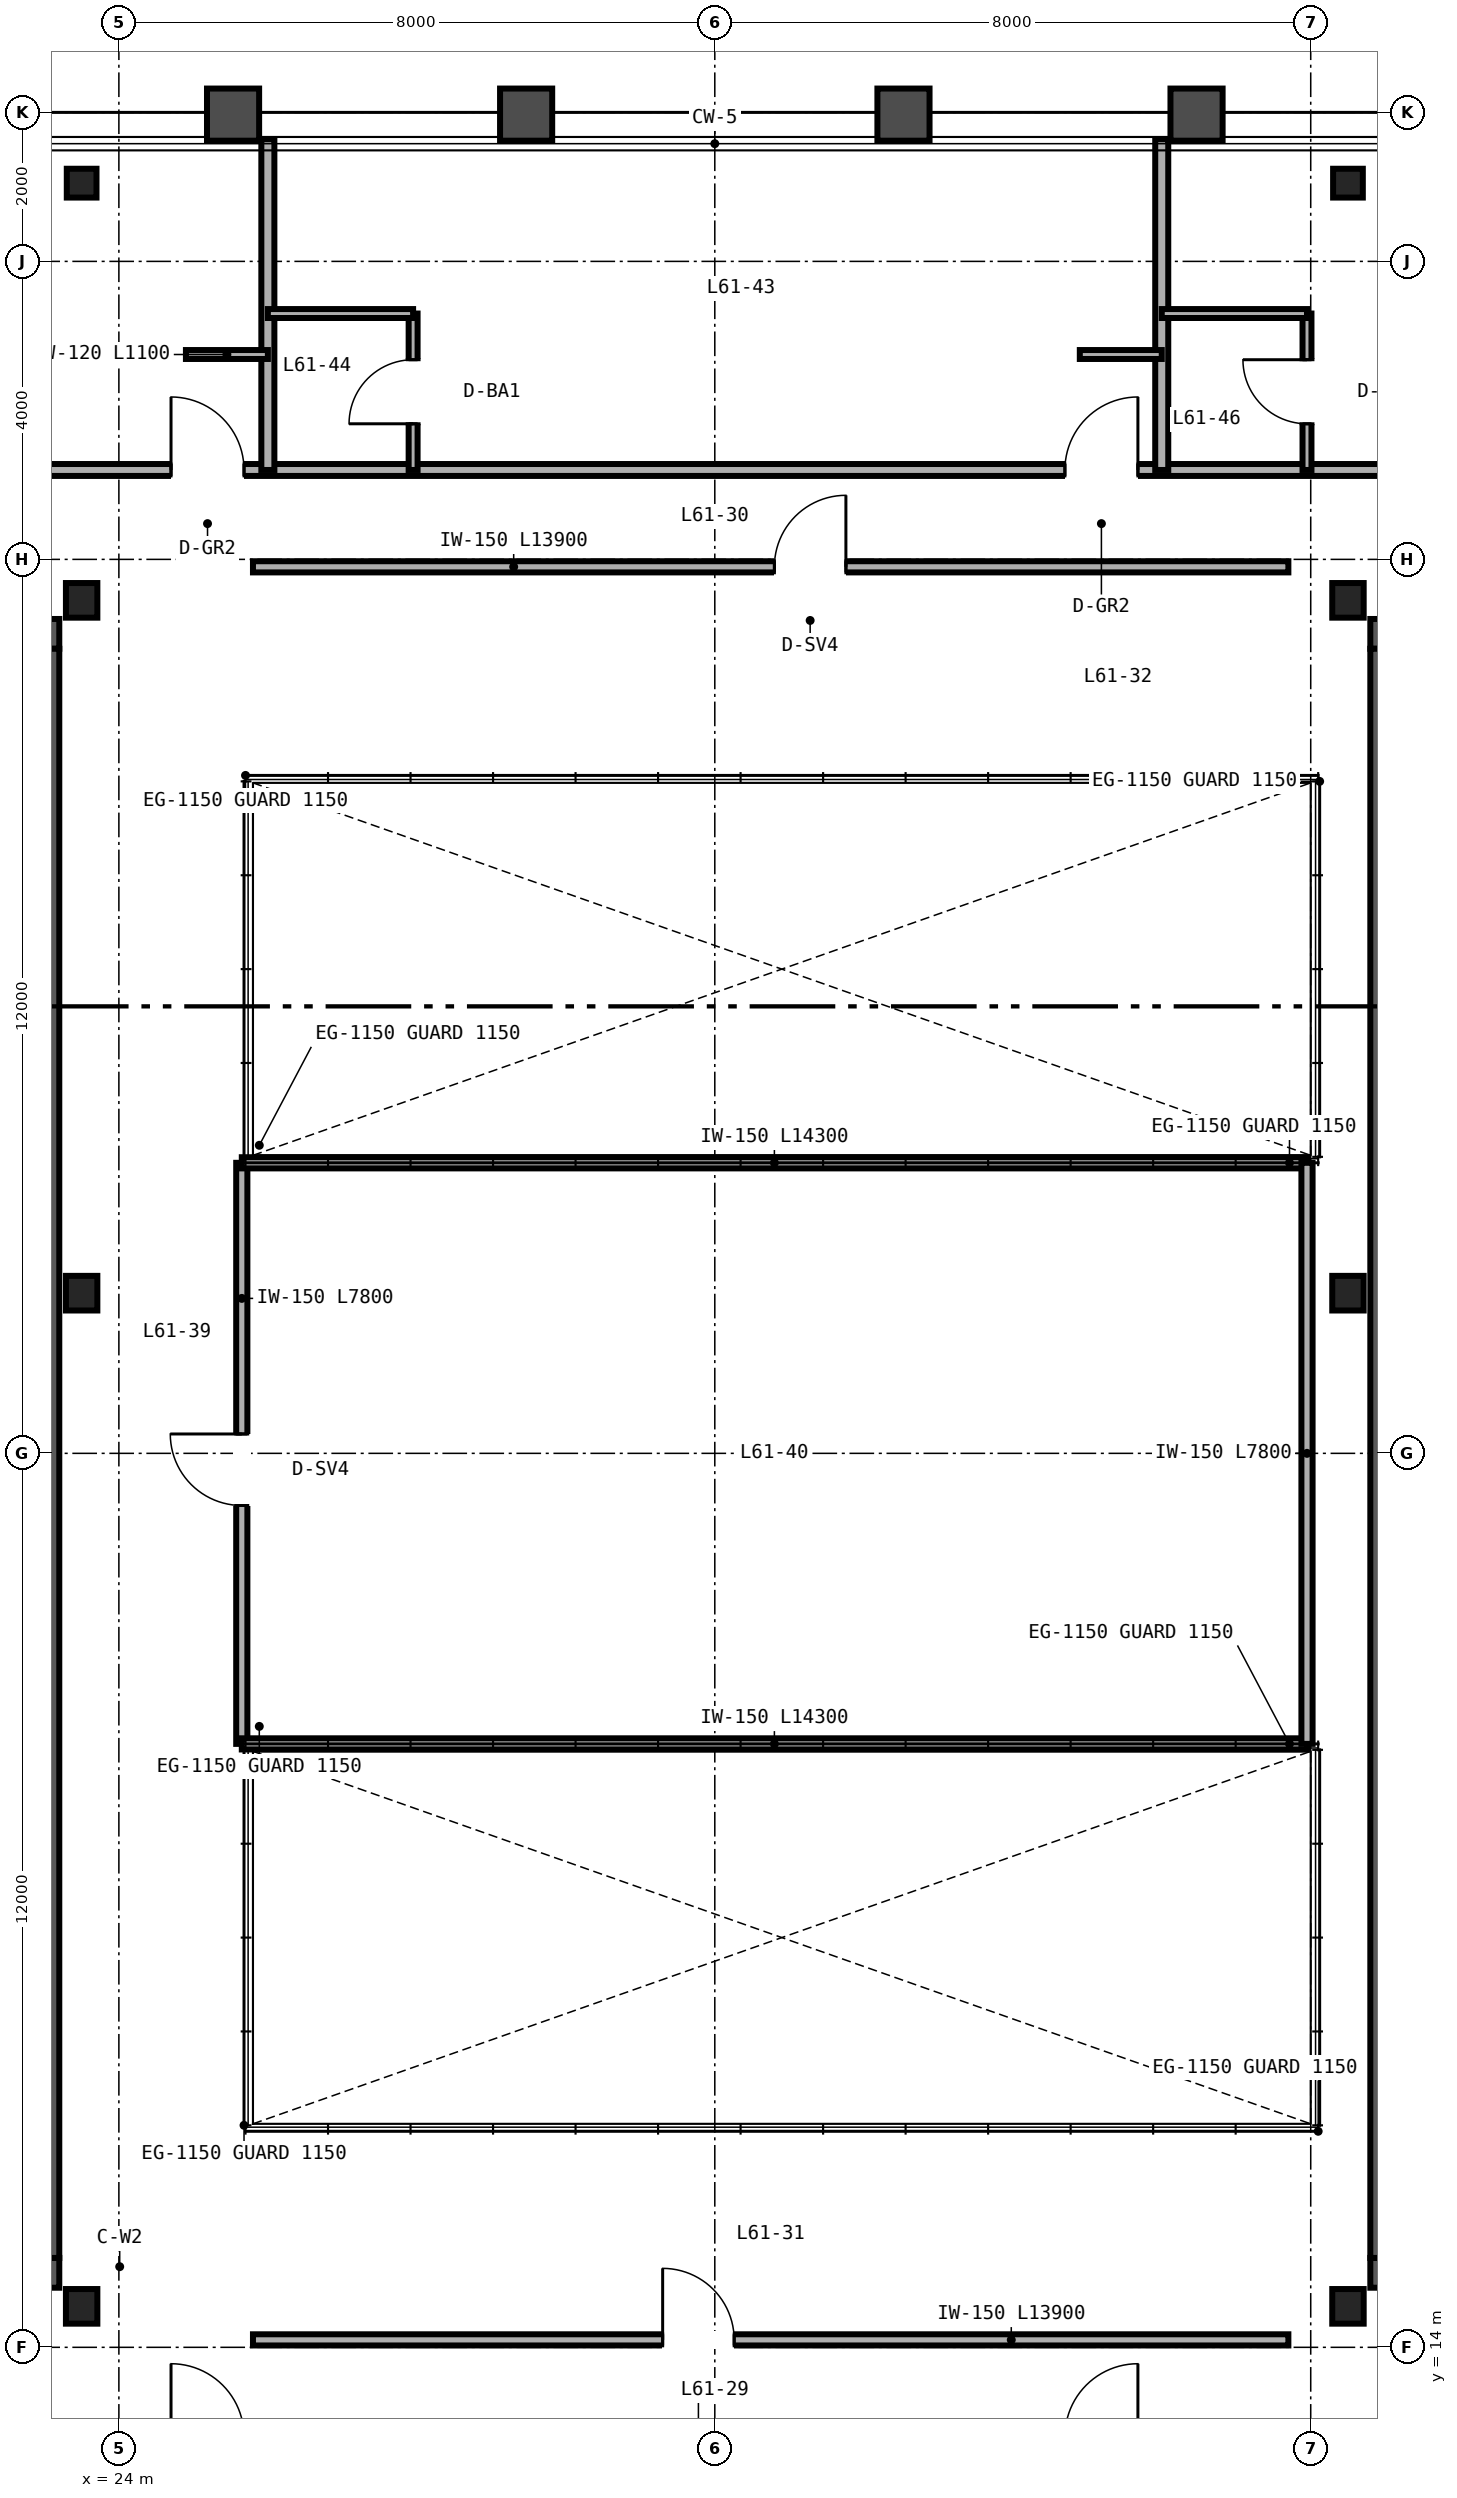
"""IFC4 building model, lengths in metres.
Left out: names, types, materials, properties, quantities, classifications, styles, units other than length and angle.
Written with IfcOpenShell. Run it as: python <this file> out.ifc"""

import sys

from ifc_helpers import new_model, si_unit, direction, frame, frame_2d, origin, origin_2d, place, context, subcontext, project, spatial, rectangle, i_section, extrude, source, transform, mapped, element, fill, save


model = new_model("IFC4")
c1 = context("Model", 3, precision=1e-05, world=origin(), true_north=direction((0.0, 1.0)))
c2 = subcontext(c1, "Body", "Model", "MODEL_VIEW")
j1 = project(units=[si_unit("LENGTHUNIT", "METRE"), si_unit("PLANEANGLEUNIT", "RADIAN")], contexts=[c1])
p1 = place(None, origin())
s1 = spatial("IfcSite", under=j1, at=p1, CompositionType="ELEMENT")
p2 = place(p1, origin())
s2 = spatial("IfcBuilding", under=s1, at=p2, CompositionType="ELEMENT")
p3 = place(p2, frame((0.0, 0.0, 243.6)))
s3 = spatial("IfcBuildingStorey", under=s2, at=p3, CompositionType="ELEMENT", Elevation=243.6)
p4 = place(p3, frame((10.8, 15.0, 0.0), z_axis=(0.0, 0.0, 1.0), x_axis=(1.0, 0.0, 0.0)))
e1 = element("IfcWall", 1, at=p4, inside=s3, PredefinedType="SHEAR", context=c2, shape_type="SweptSolid", body=[
    extrude(rectangle(XDim=12.4, YDim=0.4, at=frame_2d((6.2, 0.0))), origin(), (0.0, 0.0, 1.0), 3.28),
])
p5 = place(p4, frame((8.78, 0.0, 0.0)))
e2 = element("IfcOpeningElement", 2, at=p5, cuts=e1, PredefinedType="OPENING", context=c2, shape_type="SweptSolid", body=[
    extrude(rectangle(XDim=1.0, YDim=2.15, at=frame_2d((0.5, 1.075))), frame((0.0, 0.21, 0.0), z_axis=(0.0, -1.0, 0.0), x_axis=(1.0, 0.0, 0.0)), (0.0, 0.0, 1.0), 0.42),
])
p6 = place(p3, frame((10.8, 37.0, 0.0), z_axis=(0.0, 0.0, 1.0), x_axis=(1.0, 0.0, 0.0)))
e3 = element("IfcWall", 3, at=p6, inside=s3, PredefinedType="SHEAR", context=c2, shape_type="SweptSolid", body=[
    extrude(rectangle(XDim=12.4, YDim=0.4, at=frame_2d((6.2, 0.0))), origin(), (0.0, 0.0, 1.0), 3.28),
])
p7 = place(p6, frame((8.78, 0.0, 0.0)))
e4 = element("IfcOpeningElement", 4, at=p7, cuts=e3, PredefinedType="OPENING", context=c2, shape_type="SweptSolid", body=[
    extrude(rectangle(XDim=1.0, YDim=2.15, at=frame_2d((0.5, 1.075))), frame((0.0, 0.21, 0.0), z_axis=(0.0, -1.0, 0.0), x_axis=(1.0, 0.0, 0.0)), (0.0, 0.0, 1.0), 0.42),
])
p8 = place(p3, frame((23.0, 15.2, 0.0), z_axis=(0.0, 0.0, 1.0), x_axis=(0.0, 1.0, 0.0)))
e5 = element("IfcWall", 5, at=p8, inside=s3, PredefinedType="SHEAR", context=c2, shape_type="SweptSolid", body=[
    extrude(rectangle(XDim=21.6, YDim=0.4, at=frame_2d((10.8, 0.0))), origin(), (0.0, 0.0, 1.0), 3.28),
])
p9 = place(p3, frame((40.8, 15.0, 0.0), z_axis=(0.0, 0.0, 1.0), x_axis=(1.0, 0.0, 0.0)))
e6 = element("IfcWall", 6, at=p9, inside=s3, PredefinedType="SHEAR", context=c2, shape_type="SweptSolid", body=[
    extrude(rectangle(XDim=12.4, YDim=0.4, at=frame_2d((6.2, 0.0))), origin(), (0.0, 0.0, 1.0), 3.28),
])
p10 = place(p9, frame((4.3, 0.0, 0.0)))
e7 = element("IfcOpeningElement", 7, at=p10, cuts=e6, PredefinedType="OPENING", context=c2, shape_type="SweptSolid", body=[
    extrude(rectangle(XDim=1.0, YDim=2.15, at=frame_2d((0.5, 1.075))), frame((0.0, 0.21, 0.0), z_axis=(0.0, -1.0, 0.0), x_axis=(1.0, 0.0, 0.0)), (0.0, 0.0, 1.0), 0.42),
])
p11 = place(p3, frame((40.8, 37.0, 0.0), z_axis=(0.0, 0.0, 1.0), x_axis=(1.0, 0.0, 0.0)))
e8 = element("IfcWall", 8, at=p11, inside=s3, PredefinedType="SHEAR", context=c2, shape_type="SweptSolid", body=[
    extrude(rectangle(XDim=12.4, YDim=0.4, at=frame_2d((6.2, 0.0))), origin(), (0.0, 0.0, 1.0), 3.28),
])
p12 = place(p11, frame((9.9, 0.0, 0.0)))
e9 = element("IfcOpeningElement", 9, at=p12, cuts=e8, PredefinedType="OPENING", context=c2, shape_type="SweptSolid", body=[
    extrude(rectangle(XDim=1.1, YDim=2.15, at=frame_2d((0.55, 1.075))), frame((0.0, 0.21, 0.0), z_axis=(0.0, -1.0, 0.0), x_axis=(1.0, 0.0, 0.0)), (0.0, 0.0, 1.0), 0.42),
])
p13 = place(p3, frame((41.0, 15.2, 0.0), z_axis=(0.0, 0.0, 1.0), x_axis=(0.0, 1.0, 0.0)))
e10 = element("IfcWall", 10, at=p13, inside=s3, PredefinedType="SHEAR", context=c2, shape_type="SweptSolid", body=[
    extrude(rectangle(XDim=21.6, YDim=0.4, at=frame_2d((10.8, 0.0))), origin(), (0.0, 0.0, 1.0), 3.28),
])
m1 = source(origin(), c2, "Body", "SweptSolid", [
    extrude(i_section(OverallWidth=0.422, OverallDepth=0.465, WebThickness=0.045, FlangeThickness=0.073, FilletRadius=0.025, at=origin_2d()), origin(), (0.0, 0.0, 1.0), 3.28),
])
for number, where, z_axis, x_axis in (
    (11, (23.5, 14.55, 0.0), (0.0, 0.0, 1.0), (1.0, 0.0, 0.0)),
    (12, (40.5, 14.55, 0.0), (0.0, 0.0, 1.0), (1.0, 0.0, 0.0)),
    (13, (23.5, 28.15, 0.0), (0.0, 0.0, 1.0), (1.0, 0.0, 0.0)),
    (14, (40.5, 28.15, 0.0), (0.0, 0.0, 1.0), (1.0, 0.0, 0.0)),
    (15, (23.5, 37.45, 0.0), (0.0, 0.0, 1.0), (1.0, 0.0, 0.0)),
    (16, (40.5, 37.45, 0.0), (0.0, 0.0, 1.0), (1.0, 0.0, 0.0)),
):
    element("IfcColumn", number, at=place(p3, frame(where, z_axis=z_axis, x_axis=x_axis)), inside=s3, PredefinedType="COLUMN", context=c2, shape_type="MappedRepresentation", body=[
        mapped(m1, transform((0.0, 0.0, 0.0), scale=1.0)),
    ])
m2 = source(origin(), c2, "Body", "SweptSolid", [
    extrude(i_section(OverallWidth=0.399, OverallDepth=0.387, WebThickness=0.021, FlangeThickness=0.033, FilletRadius=0.025, at=origin_2d()), origin(), (0.0, 0.0, 1.0), 3.28),
])
for number, where, z_axis, x_axis in (
    (17, (23.5, 43.05, 0.0), (0.0, 0.0, 1.0), (1.0, 0.0, 0.0)),
    (18, (40.5, 43.05, 0.0), (0.0, 0.0, 1.0), (1.0, 0.0, 0.0)),
):
    element("IfcColumn", number, at=place(p3, frame(where, z_axis=z_axis, x_axis=x_axis)), inside=s3, PredefinedType="COLUMN", context=c2, shape_type="MappedRepresentation", body=[
        mapped(m2, transform((0.0, 0.0, 0.0), scale=1.0)),
    ])
p14 = place(p3, frame((25.8, 14.1, 0.0), z_axis=(0.0, 0.0, 1.0), x_axis=(1.0, 0.0, 0.0)))
e19 = element("IfcWall", 19, at=p14, inside=s3, PredefinedType="PARTITIONING", context=c2, shape_type="SweptSolid", body=[
    extrude(rectangle(XDim=13.9, YDim=0.15, at=frame_2d((6.95, 0.0))), origin(), (0.0, 0.0, 1.0), 3.28),
])
p15 = place(p14, frame((5.5, 0.0, 0.0)))
e20 = element("IfcOpeningElement", 20, at=p15, cuts=e19, PredefinedType="OPENING", context=c2, shape_type="SweptSolid", body=[
    extrude(rectangle(XDim=0.96, YDim=2.15, at=frame_2d((0.48, 1.075))), frame((0.0, 0.085, 0.0), z_axis=(0.0, -1.0, 0.0), x_axis=(1.0, 0.0, 0.0)), (0.0, 0.0, 1.0), 0.17),
])
p16 = place(p3, frame((25.8, 37.9, 0.0), z_axis=(0.0, 0.0, 1.0), x_axis=(1.0, 0.0, 0.0)))
e21 = element("IfcWall", 21, at=p16, inside=s3, PredefinedType="PARTITIONING", context=c2, shape_type="SweptSolid", body=[
    extrude(rectangle(XDim=13.9, YDim=0.15, at=frame_2d((6.95, 0.0))), origin(), (0.0, 0.0, 1.0), 3.28),
])
p17 = place(p16, frame((7.0, 0.0, 0.0)))
e22 = element("IfcOpeningElement", 22, at=p17, cuts=e21, PredefinedType="OPENING", context=c2, shape_type="SweptSolid", body=[
    extrude(rectangle(XDim=0.96, YDim=2.15, at=frame_2d((0.48, 1.075))), frame((0.0, 0.085, 0.0), z_axis=(0.0, -1.0, 0.0), x_axis=(1.0, 0.0, 0.0)), (0.0, 0.0, 1.0), 0.17),
])
p18 = place(p3, frame((25.65, 22.1, 0.0), z_axis=(0.0, 0.0, 1.0), x_axis=(0.0, 1.0, 0.0)))
e23 = element("IfcWall", 23, at=p18, inside=s3, PredefinedType="PARTITIONING", context=c2, shape_type="SweptSolid", body=[
    extrude(rectangle(XDim=7.8, YDim=0.15, at=frame_2d((3.9, 0.0))), origin(), (0.0, 0.0, 1.0), 2.36),
])
p19 = place(p18, frame((3.2, 0.0, 0.0)))
e24 = element("IfcOpeningElement", 24, at=p19, cuts=e23, PredefinedType="OPENING", context=c2, shape_type="SweptSolid", body=[
    extrude(rectangle(XDim=0.96, YDim=2.15, at=frame_2d((0.48, 1.075))), frame((0.0, 0.085, 0.0), z_axis=(0.0, -1.0, 0.0), x_axis=(1.0, 0.0, 0.0)), (0.0, 0.0, 1.0), 0.17),
])
for number, where, z_axis, x_axis in (
    (25, (25.65, 22.1, 0.0), (0.0, 0.0, 1.0), (1.0, 0.0, 0.0)),
    (26, (25.65, 29.9, 0.0), (0.0, 0.0, 1.0), (1.0, 0.0, 0.0)),
):
    element("IfcWall", number, at=place(p3, frame(where, z_axis=z_axis, x_axis=x_axis)), inside=s3, PredefinedType="PARTITIONING", context=c2, shape_type="SweptSolid", body=[
        extrude(rectangle(XDim=14.3, YDim=0.15, at=frame_2d((7.15, 0.0))), origin(), (0.0, 0.0, 1.0), 3.28),
    ])
p20 = place(p3, frame((39.95, 22.1, 0.0), z_axis=(0.0, 0.0, 1.0), x_axis=(0.0, 1.0, 0.0)))
e27 = element("IfcWall", 27, at=p20, inside=s3, PredefinedType="PARTITIONING", context=c2, shape_type="SweptSolid", body=[
    extrude(rectangle(XDim=7.8, YDim=0.15, at=frame_2d((3.9, 0.0))), origin(), (0.0, 0.0, 1.0), 2.36),
])
p21 = place(p3, frame((14.0, 39.2, 0.0), z_axis=(0.0, 0.0, 1.0), x_axis=(1.0, 0.0, 0.0)))
e28 = element("IfcWall", 28, at=p21, inside=s3, PredefinedType="PARTITIONING", context=c2, shape_type="SweptSolid", body=[
    extrude(rectangle(XDim=36.0, YDim=0.16, at=frame_2d((18.0, 0.0))), origin(), (0.0, 0.0, 1.0), 2.823),
])
p22 = place(p21, frame((10.7, 0.0, 0.0)))
e29 = element("IfcOpeningElement", 29, at=p22, cuts=e28, PredefinedType="OPENING", context=c2, shape_type="SweptSolid", body=[
    extrude(rectangle(XDim=0.98, YDim=2.2, at=frame_2d((0.49, 1.1))), frame((0.0, 0.09, 0.0), z_axis=(0.0, -1.0, 0.0), x_axis=(1.0, 0.0, 0.0)), (0.0, 0.0, 1.0), 0.18),
])
p23 = place(p21, frame((22.7, 0.0, 0.0)))
e30 = element("IfcOpeningElement", 30, at=p23, cuts=e28, PredefinedType="OPENING", context=c2, shape_type="SweptSolid", body=[
    extrude(rectangle(XDim=0.98, YDim=2.2, at=frame_2d((0.49, 1.1))), frame((0.0, 0.09, 0.0), z_axis=(0.0, -1.0, 0.0), x_axis=(1.0, 0.0, 0.0)), (0.0, 0.0, 1.0), 0.18),
])
p24 = place(p21, frame((34.7, 0.0, 0.0)))
e31 = element("IfcOpeningElement", 31, at=p24, cuts=e28, PredefinedType="OPENING", context=c2, shape_type="SweptSolid", body=[
    extrude(rectangle(XDim=0.98, YDim=2.2, at=frame_2d((0.49, 1.1))), frame((0.0, 0.09, 0.0), z_axis=(0.0, -1.0, 0.0), x_axis=(1.0, 0.0, 0.0)), (0.0, 0.0, 1.0), 0.18),
])
p25 = place(p3, frame((26.0, 39.2, 0.0), z_axis=(0.0, 0.0, 1.0), x_axis=(0.0, 1.0, 0.0)))
e32 = element("IfcWall", 32, at=p25, inside=s3, PredefinedType="PARTITIONING", context=c2, shape_type="SweptSolid", body=[
    extrude(rectangle(XDim=4.44, YDim=0.175, at=frame_2d((2.22, 0.0))), origin(), (0.0, 0.0, 1.0), 2.36),
])
p26 = place(p3, frame((24.9, 40.75, 0.0), z_axis=(0.0, 0.0, 1.0), x_axis=(1.0, 0.0, 0.0)))
e33 = element("IfcWall", 33, at=p26, inside=s3, PredefinedType="PARTITIONING", context=c2, shape_type="SweptSolid", body=[
    extrude(rectangle(XDim=1.1, YDim=0.12, at=frame_2d((0.55, 0.0))), origin(), (0.0, 0.0, 1.0), 3.28),
])
p27 = place(p3, frame((38.0, 39.2, 0.0), z_axis=(0.0, 0.0, 1.0), x_axis=(0.0, 1.0, 0.0)))
e34 = element("IfcWall", 34, at=p27, inside=s3, PredefinedType="PARTITIONING", context=c2, shape_type="SweptSolid", body=[
    extrude(rectangle(XDim=4.44, YDim=0.175, at=frame_2d((2.22, 0.0))), origin(), (0.0, 0.0, 1.0), 2.36),
])
p28 = place(p3, frame((27.95, 39.2, 0.0), z_axis=(0.0, 0.0, 1.0), x_axis=(0.0, 1.0, 0.0)))
e35 = element("IfcWall", 35, at=p28, inside=s3, PredefinedType="PARTITIONING", context=c2, shape_type="SweptSolid", body=[
    extrude(rectangle(XDim=2.1, YDim=0.12, at=frame_2d((1.05, 0.0))), origin(), (0.0, 0.0, 1.0), 3.28),
])
p29 = place(p28, frame((0.62, 0.0, 0.0)))
e36 = element("IfcOpeningElement", 36, at=p29, cuts=e35, PredefinedType="OPENING", context=c2, shape_type="SweptSolid", body=[
    extrude(rectangle(XDim=0.86, YDim=2.1, at=frame_2d((0.43, 1.05))), frame((0.0, 0.07, 0.0), z_axis=(0.0, -1.0, 0.0), x_axis=(1.0, 0.0, 0.0)), (0.0, 0.0, 1.0), 0.14),
])
p30 = place(p3, frame((26.0, 41.3, 0.0), z_axis=(0.0, 0.0, 1.0), x_axis=(1.0, 0.0, 0.0)))
e37 = element("IfcWall", 37, at=p30, inside=s3, PredefinedType="PARTITIONING", context=c2, shape_type="SweptSolid", body=[
    extrude(rectangle(XDim=1.95, YDim=0.12, at=frame_2d((0.975, 0.0))), origin(), (0.0, 0.0, 1.0), 3.28),
])
p31 = place(p3, frame((36.9, 40.75, 0.0), z_axis=(0.0, 0.0, 1.0), x_axis=(1.0, 0.0, 0.0)))
e38 = element("IfcWall", 38, at=p31, inside=s3, PredefinedType="PARTITIONING", context=c2, shape_type="SweptSolid", body=[
    extrude(rectangle(XDim=1.1, YDim=0.12, at=frame_2d((0.55, 0.0))), origin(), (0.0, 0.0, 1.0), 3.28),
])
p32 = place(p3, frame((39.95, 39.2, 0.0), z_axis=(0.0, 0.0, 1.0), x_axis=(0.0, 1.0, 0.0)))
e39 = element("IfcWall", 39, at=p32, inside=s3, PredefinedType="PARTITIONING", context=c2, shape_type="SweptSolid", body=[
    extrude(rectangle(XDim=2.1, YDim=0.12, at=frame_2d((1.05, 0.0))), origin(), (0.0, 0.0, 1.0), 3.28),
])
p33 = place(p32, frame((0.62, 0.0, 0.0)))
e40 = element("IfcOpeningElement", 40, at=p33, cuts=e39, PredefinedType="OPENING", context=c2, shape_type="SweptSolid", body=[
    extrude(rectangle(XDim=0.86, YDim=2.1, at=frame_2d((0.43, 1.05))), frame((0.0, 0.07, 0.0), z_axis=(0.0, -1.0, 0.0), x_axis=(1.0, 0.0, 0.0)), (0.0, 0.0, 1.0), 0.14),
])
p34 = place(p3, frame((38.0, 41.3, 0.0), z_axis=(0.0, 0.0, 1.0), x_axis=(1.0, 0.0, 0.0)))
e41 = element("IfcWall", 41, at=p34, inside=s3, PredefinedType="PARTITIONING", context=c2, shape_type="SweptSolid", body=[
    extrude(rectangle(XDim=1.95, YDim=0.12, at=frame_2d((0.975, 0.0))), origin(), (0.0, 0.0, 1.0), 3.28),
])
m3 = source(origin(), c2, "Body", "SweptSolid", [
    extrude(rectangle(XDim=0.96, YDim=2.15, at=frame_2d((0.48, 1.075))), frame((0.0, 0.025, 0.0), z_axis=(0.0, -1.0, 0.0), x_axis=(1.0, 0.0, 0.0)), (0.0, 0.0, 1.0), 0.05),
])
p35 = place(p15, origin())
e42 = element("IfcDoor", 42, at=p35, inside=s3, OperationType="SINGLE_SWING_LEFT", PredefinedType="DOOR", context=c2, shape_type="MappedRepresentation", body=[
    mapped(m3, transform((0.0, 0.0, 0.0), scale=1.0)),
])
fill(e20, e42)
p36 = place(p17, origin())
e43 = element("IfcDoor", 43, at=p36, inside=s3, OperationType="SINGLE_SWING_RIGHT", PredefinedType="DOOR", context=c2, shape_type="MappedRepresentation", body=[
    mapped(m3, transform((0.0, 0.0, 0.0), scale=1.0)),
])
fill(e22, e43)
p37 = place(p19, origin())
e44 = element("IfcDoor", 44, at=p37, inside=s3, OperationType="SINGLE_SWING_RIGHT", PredefinedType="DOOR", context=c2, shape_type="MappedRepresentation", body=[
    mapped(m3, transform((0.0, 0.0, 0.0), scale=1.0)),
])
fill(e24, e44)
m4 = source(origin(), c2, "Body", "SweptSolid", [
    extrude(rectangle(XDim=0.86, YDim=2.1, at=frame_2d((0.43, 1.05))), frame((0.0, 0.025, 0.0), z_axis=(0.0, -1.0, 0.0), x_axis=(1.0, 0.0, 0.0)), (0.0, 0.0, 1.0), 0.05),
])
p38 = place(p29, origin())
e45 = element("IfcDoor", 45, at=p38, inside=s3, OperationType="SINGLE_SWING_LEFT", PredefinedType="DOOR", context=c2, shape_type="MappedRepresentation", body=[
    mapped(m4, transform((0.0, 0.0, 0.0), scale=1.0)),
])
fill(e36, e45)
p39 = place(p33, origin())
e46 = element("IfcDoor", 46, at=p39, inside=s3, OperationType="SINGLE_SWING_RIGHT", PredefinedType="DOOR", context=c2, shape_type="MappedRepresentation", body=[
    mapped(m4, transform((0.0, 0.0, 0.0), scale=1.0)),
])
fill(e40, e46)
m5 = source(origin(), c2, "Body", "SweptSolid", [
    extrude(rectangle(XDim=0.98, YDim=2.2, at=frame_2d((0.49, 1.1))), frame((0.0, 0.025, 0.0), z_axis=(0.0, -1.0, 0.0), x_axis=(1.0, 0.0, 0.0)), (0.0, 0.0, 1.0), 0.05),
])
p40 = place(p22, origin())
e47 = element("IfcDoor", 47, at=p40, inside=s3, OperationType="SINGLE_SWING_LEFT", PredefinedType="DOOR", context=c2, shape_type="MappedRepresentation", body=[
    mapped(m5, transform((0.0, 0.0, 0.0), scale=1.0)),
])
fill(e29, e47)
p41 = place(p23, origin())
e48 = element("IfcDoor", 48, at=p41, inside=s3, OperationType="SINGLE_SWING_RIGHT", PredefinedType="DOOR", context=c2, shape_type="MappedRepresentation", body=[
    mapped(m5, transform((0.0, 0.0, 0.0), scale=1.0)),
])
fill(e30, e48)
save(model, sys.argv[1])
